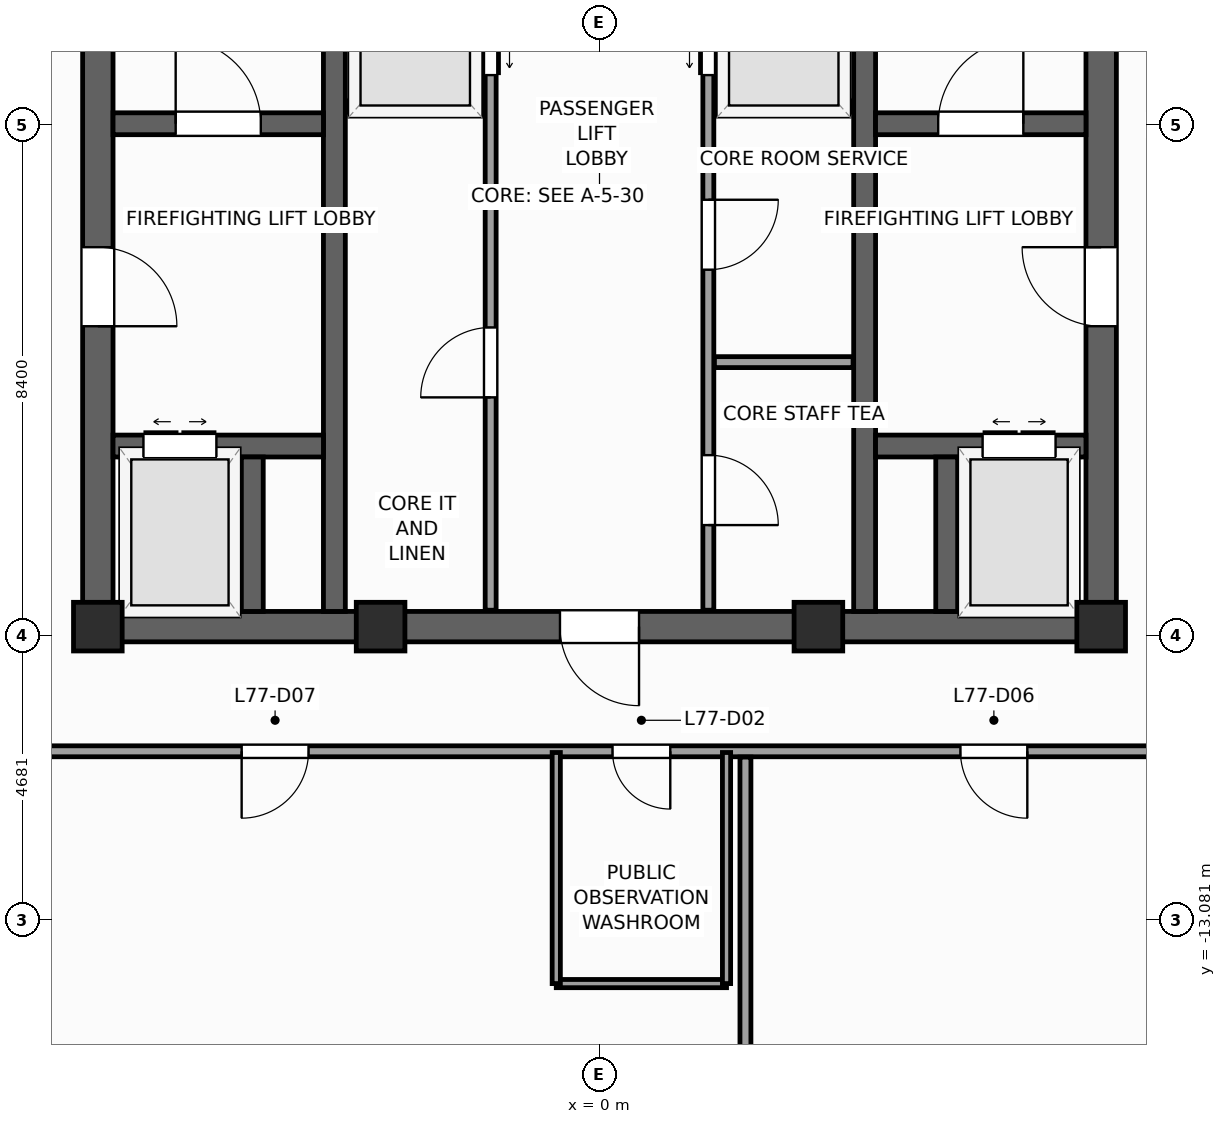
"""IFC4 building model, lengths in metres.
Left out: names, types, materials, properties, quantities, classifications, styles, units other than length and angle.
Written with IfcOpenShell. Run it as: python <this file> out.ifc"""

import sys

from ifc_helpers import new_model, si_unit, direction, frame, frame_2d, origin, origin_2d, place, context, subcontext, project, spatial, rectangle, extrude, source, transform, mapped, element, fill, save


model = new_model("IFC4")
c1 = context("Model", 3, precision=1e-05, world=origin(), true_north=direction((0.0, 1.0)))
c2 = subcontext(c1, "Body", "Model", "MODEL_VIEW")
j1 = project(units=[si_unit("LENGTHUNIT", "METRE"), si_unit("PLANEANGLEUNIT", "RADIAN")], contexts=[c1])
p1 = place(None, origin())
s1 = spatial("IfcSite", under=j1, at=p1, CompositionType="ELEMENT")
p2 = place(p1, origin())
s2 = spatial("IfcBuilding", under=s1, at=p2, CompositionType="ELEMENT")
p3 = place(p2, frame((0.0, 0.0, 312.0)))
s3 = spatial("IfcBuildingStorey", under=s2, at=p3, CompositionType="ELEMENT", Elevation=312.0)
p4 = place(p3, frame((-8.5, -8.25, 0.0), z_axis=(0.0, 0.0, 1.0), x_axis=(1.0, 0.0, 0.0)))
e1 = element("IfcWall", 1, at=p4, inside=s3, PredefinedType="SHEAR", context=c2, shape_type="SweptSolid", body=[
    extrude(rectangle(XDim=17.0, YDim=0.5, at=frame_2d((8.5, 0.0))), origin(), (0.0, 0.0, 1.0), 4.8),
])
p5 = place(p4, frame((7.85, 0.0, 0.0)))
e2 = element("IfcOpeningElement", 2, at=p5, cuts=e1, PredefinedType="OPENING", context=c2, shape_type="SweptSolid", body=[
    extrude(rectangle(XDim=1.3, YDim=2.2, at=frame_2d((0.65, 1.1))), frame((0.0, 0.26, 0.0), z_axis=(0.0, -1.0, 0.0), x_axis=(1.0, 0.0, 0.0)), (0.0, 0.0, 1.0), 0.52),
])
p6 = place(p3, frame((-8.25, -8.0, 0.0), z_axis=(0.0, 0.0, 1.0), x_axis=(0.0, 1.0, 0.0)))
e3 = element("IfcWall", 3, at=p6, inside=s3, PredefinedType="SHEAR", context=c2, shape_type="SweptSolid", body=[
    extrude(rectangle(XDim=16.0, YDim=0.5, at=frame_2d((8.0, 0.0))), origin(), (0.0, 0.0, 1.0), 4.8),
])
p7 = place(p6, frame((4.69, 0.0, 0.0)))
e4 = element("IfcOpeningElement", 4, at=p7, cuts=e3, PredefinedType="OPENING", context=c2, shape_type="SweptSolid", body=[
    extrude(rectangle(XDim=1.3, YDim=2.2, at=frame_2d((0.65, 1.1))), frame((0.0, 0.26, 0.0), z_axis=(0.0, -1.0, 0.0), x_axis=(1.0, 0.0, 0.0)), (0.0, 0.0, 1.0), 0.52),
])
p8 = place(p3, frame((8.25, -8.0, 0.0), z_axis=(0.0, 0.0, 1.0), x_axis=(0.0, 1.0, 0.0)))
e5 = element("IfcWall", 5, at=p8, inside=s3, PredefinedType="SHEAR", context=c2, shape_type="SweptSolid", body=[
    extrude(rectangle(XDim=16.0, YDim=0.5, at=frame_2d((8.0, 0.0))), origin(), (0.0, 0.0, 1.0), 4.8),
])
p9 = place(p8, frame((4.69, 0.0, 0.0)))
e6 = element("IfcOpeningElement", 6, at=p9, cuts=e5, PredefinedType="OPENING", context=c2, shape_type="SweptSolid", body=[
    extrude(rectangle(XDim=1.3, YDim=2.2, at=frame_2d((0.65, 1.1))), frame((0.0, 0.26, 0.0), z_axis=(0.0, -1.0, 0.0), x_axis=(1.0, 0.0, 0.0)), (0.0, 0.0, 1.0), 0.52),
])
for number, where, z_axis, x_axis in (
    (7, (-4.36, -8.0, 0.0), (0.0, 0.0, 1.0), (0.0, 1.0, 0.0)),
    (8, (4.36, -8.0, 0.0), (0.0, 0.0, 1.0), (0.0, 1.0, 0.0)),
):
    element("IfcWall", number, at=place(p3, frame(where, z_axis=z_axis, x_axis=x_axis)), inside=s3, PredefinedType="SHEAR", context=c2, shape_type="SweptSolid", body=[
        extrude(rectangle(XDim=16.0, YDim=0.36, at=frame_2d((8.0, 0.0))), origin(), (0.0, 0.0, 1.0), 4.8),
    ])
p10 = place(p3, frame((-8.0, 0.02, 0.0), z_axis=(0.0, 0.0, 1.0), x_axis=(1.0, 0.0, 0.0)))
e9 = element("IfcWall", 9, at=p10, inside=s3, PredefinedType="SHEAR", context=c2, shape_type="SweptSolid", body=[
    extrude(rectangle(XDim=3.46, YDim=0.36, at=frame_2d((1.73, 0.0))), origin(), (0.0, 0.0, 1.0), 4.8),
])
p11 = place(p10, frame((1.03, 0.0, 0.0)))
e10 = element("IfcOpeningElement", 10, at=p11, cuts=e9, PredefinedType="OPENING", context=c2, shape_type="SweptSolid", body=[
    extrude(rectangle(XDim=1.4, YDim=2.2, at=frame_2d((0.7, 1.1))), frame((0.0, 0.19, 0.0), z_axis=(0.0, -1.0, 0.0), x_axis=(1.0, 0.0, 0.0)), (0.0, 0.0, 1.0), 0.38),
])
p12 = place(p3, frame((4.54, 0.02, 0.0), z_axis=(0.0, 0.0, 1.0), x_axis=(1.0, 0.0, 0.0)))
e11 = element("IfcWall", 11, at=p12, inside=s3, PredefinedType="SHEAR", context=c2, shape_type="SweptSolid", body=[
    extrude(rectangle(XDim=3.46, YDim=0.36, at=frame_2d((1.73, 0.0))), origin(), (0.0, 0.0, 1.0), 4.8),
])
p13 = place(p12, frame((1.03, 0.0, 0.0)))
e12 = element("IfcOpeningElement", 12, at=p13, cuts=e11, PredefinedType="OPENING", context=c2, shape_type="SweptSolid", body=[
    extrude(rectangle(XDim=1.4, YDim=2.2, at=frame_2d((0.7, 1.1))), frame((0.0, 0.19, 0.0), z_axis=(0.0, -1.0, 0.0), x_axis=(1.0, 0.0, 0.0)), (0.0, 0.0, 1.0), 0.38),
])
p14 = place(p3, frame((-8.0, -5.28, 0.0), z_axis=(0.0, 0.0, 1.0), x_axis=(1.0, 0.0, 0.0)))
e13 = element("IfcWall", 13, at=p14, inside=s3, PredefinedType="SHEAR", context=c2, shape_type="SweptSolid", body=[
    extrude(rectangle(XDim=3.46, YDim=0.36, at=frame_2d((1.73, 0.0))), origin(), (0.0, 0.0, 1.0), 4.8),
])
p15 = place(p14, frame((0.5, 0.0, 0.0)))
e14 = element("IfcOpeningElement", 14, at=p15, cuts=e13, PredefinedType="OPENING", context=c2, shape_type="SweptSolid", body=[
    extrude(rectangle(XDim=1.2, YDim=2.25, at=frame_2d((0.6, 1.125))), frame((0.0, 0.19, 0.0), z_axis=(0.0, -1.0, 0.0), x_axis=(1.0, 0.0, 0.0)), (0.0, 0.0, 1.0), 0.38),
])
p16 = place(p3, frame((4.54, -5.28, 0.0), z_axis=(0.0, 0.0, 1.0), x_axis=(1.0, 0.0, 0.0)))
e15 = element("IfcWall", 15, at=p16, inside=s3, PredefinedType="SHEAR", context=c2, shape_type="SweptSolid", body=[
    extrude(rectangle(XDim=3.46, YDim=0.36, at=frame_2d((1.73, 0.0))), origin(), (0.0, 0.0, 1.0), 4.8),
])
p17 = place(p16, frame((1.76, 0.0, 0.0)))
e16 = element("IfcOpeningElement", 16, at=p17, cuts=e15, PredefinedType="OPENING", context=c2, shape_type="SweptSolid", body=[
    extrude(rectangle(XDim=1.2, YDim=2.25, at=frame_2d((0.6, 1.125))), frame((0.0, 0.19, 0.0), z_axis=(0.0, -1.0, 0.0), x_axis=(1.0, 0.0, 0.0)), (0.0, 0.0, 1.0), 0.38),
])
for number, where, z_axis, x_axis in (
    (17, (-5.71, -8.0, 0.0), (0.0, 0.0, 1.0), (0.0, 1.0, 0.0)),
    (18, (5.71, -8.0, 0.0), (0.0, 0.0, 1.0), (0.0, 1.0, 0.0)),
):
    element("IfcWall", number, at=place(p3, frame(where, z_axis=z_axis, x_axis=x_axis)), inside=s3, PredefinedType="SHEAR", context=c2, shape_type="SweptSolid", body=[
        extrude(rectangle(XDim=2.54, YDim=0.36, at=frame_2d((1.27, 0.0))), origin(), (0.0, 0.0, 1.0), 4.8),
    ])
m1 = source(origin(), c2, "Body", "SweptSolid", [
    extrude(rectangle(XDim=0.8, YDim=0.8, at=origin_2d()), origin(), (0.0, 0.0, 1.0), 4.8),
])
for number, where, z_axis, x_axis in (
    (19, (-8.25, -8.25, 0.0), (0.0, 0.0, 1.0), (1.0, 0.0, 0.0)),
    (20, (8.25, -8.25, 0.0), (0.0, 0.0, 1.0), (1.0, 0.0, 0.0)),
    (21, (-3.6, -8.25, 0.0), (0.0, 0.0, 1.0), (1.0, 0.0, 0.0)),
    (22, (3.6, -8.25, 0.0), (0.0, 0.0, 1.0), (1.0, 0.0, 0.0)),
):
    element("IfcColumn", number, at=place(p3, frame(where, z_axis=z_axis, x_axis=x_axis)), inside=s3, PredefinedType="PILASTER", context=c2, shape_type="MappedRepresentation", body=[
        mapped(m1, transform((0.0, 0.0, 0.0), scale=1.0)),
    ])
p18 = place(p3, frame((-1.79, -7.98, 0.0), z_axis=(0.0, 0.0, 1.0), x_axis=(0.0, 1.0, 0.0)))
e23 = element("IfcWall", 23, at=p18, inside=s3, PredefinedType="PARTITIONING", context=c2, shape_type="SweptSolid", body=[
    extrude(rectangle(XDim=12.38, YDim=0.18, at=frame_2d((6.19, 0.0))), origin(), (0.0, 0.0, 1.0), 4.55),
])
p19 = place(p18, frame((8.8, 0.0, 0.0)))
e24 = element("IfcOpeningElement", 24, at=p19, cuts=e23, PredefinedType="OPENING", context=c2, shape_type="SweptSolid", body=[
    extrude(rectangle(XDim=1.1, YDim=2.2, at=frame_2d((0.55, 1.1))), frame((0.0, 0.1, 0.0), z_axis=(0.0, -1.0, 0.0), x_axis=(1.0, 0.0, 0.0)), (0.0, 0.0, 1.0), 0.2),
])
p20 = place(p18, frame((10.86, 0.0, 0.0)))
e25 = element("IfcOpeningElement", 25, at=p20, cuts=e23, PredefinedType="OPENING", context=c2, shape_type="SweptSolid", body=[
    extrude(rectangle(XDim=1.1, YDim=2.2, at=frame_2d((0.55, 1.1))), frame((0.0, 0.1, 0.0), z_axis=(0.0, -1.0, 0.0), x_axis=(1.0, 0.0, 0.0)), (0.0, 0.0, 1.0), 0.2),
])
p21 = place(p18, frame((3.5, 0.0, 0.0)))
e26 = element("IfcOpeningElement", 26, at=p21, cuts=e23, PredefinedType="OPENING", context=c2, shape_type="SweptSolid", body=[
    extrude(rectangle(XDim=1.15, YDim=2.25, at=frame_2d((0.575, 1.125))), frame((0.0, 0.1, 0.0), z_axis=(0.0, -1.0, 0.0), x_axis=(1.0, 0.0, 0.0)), (0.0, 0.0, 1.0), 0.2),
])
p22 = place(p3, frame((1.79, -7.98, 0.0), z_axis=(0.0, 0.0, 1.0), x_axis=(0.0, 1.0, 0.0)))
e27 = element("IfcWall", 27, at=p22, inside=s3, PredefinedType="PARTITIONING", context=c2, shape_type="SweptSolid", body=[
    extrude(rectangle(XDim=12.38, YDim=0.18, at=frame_2d((6.19, 0.0))), origin(), (0.0, 0.0, 1.0), 4.55),
])
p23 = place(p22, frame((8.8, 0.0, 0.0)))
e28 = element("IfcOpeningElement", 28, at=p23, cuts=e27, PredefinedType="OPENING", context=c2, shape_type="SweptSolid", body=[
    extrude(rectangle(XDim=1.1, YDim=2.2, at=frame_2d((0.55, 1.1))), frame((0.0, 0.1, 0.0), z_axis=(0.0, -1.0, 0.0), x_axis=(1.0, 0.0, 0.0)), (0.0, 0.0, 1.0), 0.2),
])
p24 = place(p22, frame((10.86, 0.0, 0.0)))
e29 = element("IfcOpeningElement", 29, at=p24, cuts=e27, PredefinedType="OPENING", context=c2, shape_type="SweptSolid", body=[
    extrude(rectangle(XDim=1.1, YDim=2.2, at=frame_2d((0.55, 1.1))), frame((0.0, 0.1, 0.0), z_axis=(0.0, -1.0, 0.0), x_axis=(1.0, 0.0, 0.0)), (0.0, 0.0, 1.0), 0.2),
])
p25 = place(p22, frame((1.4, 0.0, 0.0)))
e30 = element("IfcOpeningElement", 30, at=p25, cuts=e27, PredefinedType="OPENING", context=c2, shape_type="SweptSolid", body=[
    extrude(rectangle(XDim=1.15, YDim=2.25, at=frame_2d((0.575, 1.125))), frame((0.0, 0.1, 0.0), z_axis=(0.0, -1.0, 0.0), x_axis=(1.0, 0.0, 0.0)), (0.0, 0.0, 1.0), 0.2),
])
p26 = place(p22, frame((5.6, 0.0, 0.0)))
e31 = element("IfcOpeningElement", 31, at=p26, cuts=e27, PredefinedType="OPENING", context=c2, shape_type="SweptSolid", body=[
    extrude(rectangle(XDim=1.15, YDim=2.25, at=frame_2d((0.575, 1.125))), frame((0.0, 0.1, 0.0), z_axis=(0.0, -1.0, 0.0), x_axis=(1.0, 0.0, 0.0)), (0.0, 0.0, 1.0), 0.2),
])
for number, where, z_axis, x_axis in (
    (32, (1.89, -3.9, 0.0), (0.0, 0.0, 1.0), (1.0, 0.0, 0.0)),
    (33, (-4.17, 0.3, 0.0), (0.0, 0.0, 1.0), (1.0, 0.0, 0.0)),
    (34, (1.89, 0.3, 0.0), (0.0, 0.0, 1.0), (1.0, 0.0, 0.0)),
):
    element("IfcWall", number, at=place(p3, frame(where, z_axis=z_axis, x_axis=x_axis)), inside=s3, PredefinedType="PARTITIONING", context=c2, shape_type="SweptSolid", body=[
        extrude(rectangle(XDim=2.28, YDim=0.18, at=frame_2d((1.14, 0.0))), origin(), (0.0, 0.0, 1.0), 4.55),
    ])
p27 = place(p3, frame((-10.3, -10.3, 0.0), z_axis=(0.0, 0.0, 1.0), x_axis=(1.0, 0.0, 0.0)))
e35 = element("IfcWall", 35, at=p27, inside=s3, PredefinedType="PARTITIONING", context=c2, shape_type="SweptSolid", body=[
    extrude(rectangle(XDim=21.2, YDim=0.18, at=frame_2d((10.6, 0.0))), origin(), (0.0, 0.0, 1.0), 4.55),
])
p28 = place(p27, frame((10.514, 0.0, 0.0)))
e36 = element("IfcOpeningElement", 36, at=p28, cuts=e35, PredefinedType="OPENING", context=c2, shape_type="SweptSolid", body=[
    extrude(rectangle(XDim=0.95, YDim=2.1, at=frame_2d((0.475, 1.05))), frame((0.0, 0.1, 0.0), z_axis=(0.0, -1.0, 0.0), x_axis=(1.0, 0.0, 0.0)), (0.0, 0.0, 1.0), 0.2),
])
p29 = place(p27, frame((16.236, 0.0, 0.0)))
e37 = element("IfcOpeningElement", 37, at=p29, cuts=e35, PredefinedType="OPENING", context=c2, shape_type="SweptSolid", body=[
    extrude(rectangle(XDim=1.1, YDim=2.2, at=frame_2d((0.55, 1.1))), frame((0.0, 0.1, 0.0), z_axis=(0.0, -1.0, 0.0), x_axis=(1.0, 0.0, 0.0)), (0.0, 0.0, 1.0), 0.2),
])
p30 = place(p27, frame((4.415, 0.0, 0.0)))
e38 = element("IfcOpeningElement", 38, at=p30, cuts=e35, PredefinedType="OPENING", context=c2, shape_type="SweptSolid", body=[
    extrude(rectangle(XDim=1.1, YDim=2.2, at=frame_2d((0.55, 1.1))), frame((0.0, 0.1, 0.0), z_axis=(0.0, -1.0, 0.0), x_axis=(1.0, 0.0, 0.0)), (0.0, 0.0, 1.0), 0.2),
])
p31 = place(p3, frame((2.4, -10.395, 0.0), z_axis=(0.0, 0.0, 1.0), x_axis=(0.0, -1.0, 0.0)))
e39 = element("IfcWall", 39, at=p31, inside=s3, PredefinedType="PARTITIONING", context=c2, shape_type="SweptSolid", body=[
    extrude(rectangle(XDim=14.577, YDim=0.18, at=frame_2d((7.289, 0.0))), origin(), (0.0, 0.0, 1.0), 4.22),
])
p32 = place(p3, frame((-0.711, -14.12, 0.0), z_axis=(0.0, 0.0, 1.0), x_axis=(1.0, 0.0, 0.0)))
e40 = element("IfcWall", 40, at=p32, inside=s3, PredefinedType="PARTITIONING", context=c2, shape_type="SweptSolid", body=[
    extrude(rectangle(XDim=2.8, YDim=0.135, at=frame_2d((1.4, 0.0))), origin(), (0.0, 0.0, 1.0), 4.55),
])
for number, where, z_axis, x_axis in (
    (41, (2.089, -14.12, 0.0), (0.0, 0.0, 1.0), (0.0, 1.0, 0.0)),
    (42, (-0.711, -14.12, 0.0), (0.0, 0.0, 1.0), (0.0, 1.0, 0.0)),
):
    element("IfcWall", number, at=place(p3, frame(where, z_axis=z_axis, x_axis=x_axis)), inside=s3, PredefinedType="PARTITIONING", context=c2, shape_type="SweptSolid", body=[
        extrude(rectangle(XDim=3.8, YDim=0.135, at=frame_2d((1.9, 0.0))), origin(), (0.0, 0.0, 1.0), 4.55),
    ])
m2 = source(origin(), c2, "Body", "SweptSolid", [
    extrude(rectangle(XDim=1.4, YDim=2.2, at=frame_2d((0.7, 1.1))), frame((0.0, 0.025, 0.0), z_axis=(0.0, -1.0, 0.0), x_axis=(1.0, 0.0, 0.0)), (0.0, 0.0, 1.0), 0.05),
])
p33 = place(p11, origin())
e43 = element("IfcDoor", 43, at=p33, inside=s3, OperationType="SINGLE_SWING_LEFT", PredefinedType="DOOR", context=c2, shape_type="MappedRepresentation", body=[
    mapped(m2, transform((0.0, 0.0, 0.0), scale=1.0)),
])
fill(e10, e43)
p34 = place(p13, origin())
e44 = element("IfcDoor", 44, at=p34, inside=s3, OperationType="SINGLE_SWING_RIGHT", PredefinedType="DOOR", context=c2, shape_type="MappedRepresentation", body=[
    mapped(m2, transform((0.0, 0.0, 0.0), scale=1.0)),
])
fill(e12, e44)
m3 = source(origin(), c2, "Body", "SweptSolid", [
    extrude(rectangle(XDim=1.3, YDim=2.2, at=frame_2d((0.65, 1.1))), frame((0.0, 0.025, 0.0), z_axis=(0.0, -1.0, 0.0), x_axis=(1.0, 0.0, 0.0)), (0.0, 0.0, 1.0), 0.05),
])
p35 = place(p7, frame((1.3, 0.0, 0.0), z_axis=(0.0, 0.0, 1.0), x_axis=(-1.0, 0.0, 0.0)))
e45 = element("IfcDoor", 45, at=p35, inside=s3, OperationType="SINGLE_SWING_LEFT", PredefinedType="DOOR", context=c2, shape_type="MappedRepresentation", body=[
    mapped(m3, transform((0.0, 0.0, 0.0), scale=1.0)),
])
fill(e4, e45)
p36 = place(p9, origin())
e46 = element("IfcDoor", 46, at=p36, inside=s3, OperationType="SINGLE_SWING_RIGHT", PredefinedType="DOOR", context=c2, shape_type="MappedRepresentation", body=[
    mapped(m3, transform((0.0, 0.0, 0.0), scale=1.0)),
])
fill(e6, e46)
p37 = place(p5, frame((1.3, 0.0, 0.0), z_axis=(0.0, 0.0, 1.0), x_axis=(-1.0, 0.0, 0.0)))
e47 = element("IfcDoor", 47, at=p37, inside=s3, OperationType="SINGLE_SWING_RIGHT", PredefinedType="DOOR", context=c2, shape_type="MappedRepresentation", body=[
    mapped(m3, transform((0.0, 0.0, 0.0), scale=1.0)),
])
fill(e2, e47)
m4 = source(origin(), c2, "Body", "SweptSolid", [
    extrude(rectangle(XDim=1.2, YDim=2.25, at=frame_2d((0.6, 1.125))), frame((0.0, 0.025, 0.0), z_axis=(0.0, -1.0, 0.0), x_axis=(1.0, 0.0, 0.0)), (0.0, 0.0, 1.0), 0.05),
])
p38 = place(p15, origin())
e48 = element("IfcDoor", 48, at=p38, inside=s3, OperationType="DOUBLE_DOOR_SLIDING", PredefinedType="DOOR", context=c2, shape_type="MappedRepresentation", body=[
    mapped(m4, transform((0.0, 0.0, 0.0), scale=1.0)),
])
fill(e14, e48)
p39 = place(p17, origin())
e49 = element("IfcDoor", 49, at=p39, inside=s3, OperationType="DOUBLE_DOOR_SLIDING", PredefinedType="DOOR", context=c2, shape_type="MappedRepresentation", body=[
    mapped(m4, transform((0.0, 0.0, 0.0), scale=1.0)),
])
fill(e16, e49)
m5 = source(origin(), c2, "Body", "SweptSolid", [
    extrude(rectangle(XDim=1.1, YDim=2.2, at=frame_2d((0.55, 1.1))), frame((0.0, 0.025, 0.0), z_axis=(0.0, -1.0, 0.0), x_axis=(1.0, 0.0, 0.0)), (0.0, 0.0, 1.0), 0.05),
])
p40 = place(p19, frame((1.1, 0.0, 0.0), z_axis=(0.0, 0.0, 1.0), x_axis=(-1.0, 0.0, 0.0)))
e50 = element("IfcDoor", 50, at=p40, inside=s3, OperationType="DOUBLE_DOOR_SLIDING", PredefinedType="DOOR", context=c2, shape_type="MappedRepresentation", body=[
    mapped(m5, transform((0.0, 0.0, 0.0), scale=1.0)),
])
fill(e24, e50)
p41 = place(p23, origin())
e51 = element("IfcDoor", 51, at=p41, inside=s3, OperationType="DOUBLE_DOOR_SLIDING", PredefinedType="DOOR", context=c2, shape_type="MappedRepresentation", body=[
    mapped(m5, transform((0.0, 0.0, 0.0), scale=1.0)),
])
fill(e28, e51)
m6 = source(origin(), c2, "Body", "SweptSolid", [
    extrude(rectangle(XDim=1.15, YDim=2.25, at=frame_2d((0.575, 1.125))), frame((0.0, 0.025, 0.0), z_axis=(0.0, -1.0, 0.0), x_axis=(1.0, 0.0, 0.0)), (0.0, 0.0, 1.0), 0.05),
])
p42 = place(p21, origin())
e52 = element("IfcDoor", 52, at=p42, inside=s3, OperationType="SINGLE_SWING_LEFT", PredefinedType="DOOR", context=c2, shape_type="MappedRepresentation", body=[
    mapped(m6, transform((0.0, 0.0, 0.0), scale=1.0)),
])
fill(e26, e52)
p43 = place(p25, frame((1.15, 0.0, 0.0), z_axis=(0.0, 0.0, 1.0), x_axis=(-1.0, 0.0, 0.0)))
e53 = element("IfcDoor", 53, at=p43, inside=s3, OperationType="SINGLE_SWING_LEFT", PredefinedType="DOOR", context=c2, shape_type="MappedRepresentation", body=[
    mapped(m6, transform((0.0, 0.0, 0.0), scale=1.0)),
])
fill(e30, e53)
p44 = place(p26, frame((1.15, 0.0, 0.0), z_axis=(0.0, 0.0, 1.0), x_axis=(-1.0, 0.0, 0.0)))
e54 = element("IfcDoor", 54, at=p44, inside=s3, OperationType="SINGLE_SWING_RIGHT", PredefinedType="DOOR", context=c2, shape_type="MappedRepresentation", body=[
    mapped(m6, transform((0.0, 0.0, 0.0), scale=1.0)),
])
fill(e31, e54)
m7 = source(origin(), c2, "Body", "SweptSolid", [
    extrude(rectangle(XDim=0.95, YDim=2.1, at=frame_2d((0.475, 1.05))), frame((0.0, 0.025, 0.0), z_axis=(0.0, -1.0, 0.0), x_axis=(1.0, 0.0, 0.0)), (0.0, 0.0, 1.0), 0.05),
])
p45 = place(p28, frame((0.95, 0.0, 0.0), z_axis=(0.0, 0.0, 1.0), x_axis=(-1.0, 0.0, 0.0)))
e55 = element("IfcDoor", 55, at=p45, inside=s3, OperationType="SINGLE_SWING_RIGHT", PredefinedType="DOOR", context=c2, shape_type="MappedRepresentation", body=[
    mapped(m7, transform((0.0, 0.0, 0.0), scale=1.0)),
])
fill(e36, e55)
p46 = place(p29, frame((1.1, 0.0, 0.0), z_axis=(0.0, 0.0, 1.0), x_axis=(-1.0, 0.0, 0.0)))
e56 = element("IfcDoor", 56, at=p46, inside=s3, OperationType="SINGLE_SWING_RIGHT", PredefinedType="DOOR", context=c2, shape_type="MappedRepresentation", body=[
    mapped(m5, transform((0.0, 0.0, 0.0), scale=1.0)),
])
fill(e37, e56)
p47 = place(p30, frame((1.1, 0.0, 0.0), z_axis=(0.0, 0.0, 1.0), x_axis=(-1.0, 0.0, 0.0)))
e57 = element("IfcDoor", 57, at=p47, inside=s3, OperationType="SINGLE_SWING_LEFT", PredefinedType="DOOR", context=c2, shape_type="MappedRepresentation", body=[
    mapped(m5, transform((0.0, 0.0, 0.0), scale=1.0)),
])
fill(e38, e57)
save(model, sys.argv[1])
